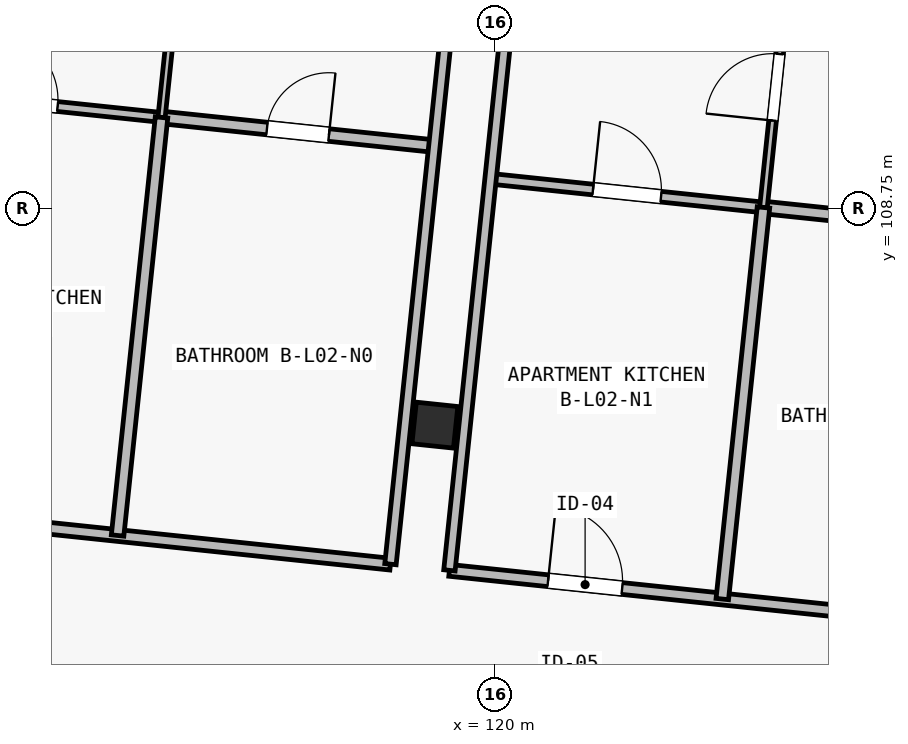
"""IFC4 building model, lengths in metres.
Left out: names, types, materials, properties, quantities, classifications, styles, units other than length and angle.
Written with IfcOpenShell. Run it as: python <this file> out.ifc"""

import sys

from ifc_helpers import new_model, si_unit, direction, frame, frame_2d, origin, origin_2d, place, context, subcontext, project, spatial, rectangle, extrude, element, fill, save


model = new_model("IFC4")
c1 = context("Model", 3, precision=1e-05, world=origin(), true_north=direction((0.0, 1.0)))
c2 = subcontext(c1, "Body", "Model", "MODEL_VIEW")
j1 = project(units=[si_unit("LENGTHUNIT", "METRE"), si_unit("PLANEANGLEUNIT", "RADIAN")], contexts=[c1])
p1 = place(None, origin())
s1 = spatial("IfcSite", under=j1, at=p1, CompositionType="ELEMENT")
p2 = place(p1, origin())
s2 = spatial("IfcBuilding", under=s1, at=p2, CompositionType="ELEMENT")
p3 = place(p2, frame((0.0, 0.0, 8.4)))
s3 = spatial("IfcBuildingStorey", under=s2, at=p3, CompositionType="ELEMENT", Elevation=8.4)
p4 = place(p3, frame((119.21, 105.898, 0.0), z_axis=(0.0, 0.0, 1.0), x_axis=(0.994521895368, -0.104528463268, 0.0)))
e1 = element("IfcColumn", 1, at=p4, inside=s3, PredefinedType="COLUMN", context=c2, shape_type="SweptSolid", body=[
    extrude(rectangle(XDim=0.55, YDim=0.55, at=origin_2d()), origin(), (0.0, 0.0, 1.0), 3.25),
])
p5 = place(p3, frame((110.446, 102.817, 0.0), z_axis=(0.0, 0.0, 1.0), x_axis=(0.994522594842, -0.104521808006, 0.0)))
e2 = element("IfcWall", 2, at=p5, inside=s3, PredefinedType="PARTITIONING", context=c2, shape_type="SweptSolid", body=[
    extrude(rectangle(XDim=8.11, YDim=0.155, at=frame_2d((4.055, 0.0))), origin(), (0.0, 0.0, 1.0), 2.97),
])
p6 = place(p5, frame((2.085, 0.0, 0.0)))
e3 = element("IfcOpeningElement", 3, at=p6, cuts=e2, PredefinedType="OPENING", context=c2, shape_type="SweptSolid", body=[
    extrude(rectangle(XDim=0.98, YDim=2.15, at=frame_2d((0.49, 1.075))), frame((0.0, 0.093, 0.0), z_axis=(0.0, -1.0, 0.0), x_axis=(1.0, 0.0, 0.0)), (0.0, 0.0, 1.0), 0.185),
])
p7 = place(p3, frame((111.446, 104.824, 0.0), z_axis=(0.0, 0.0, 1.0), x_axis=(0.994522671024, -0.104521083137, 0.0)))
e4 = element("IfcWall", 4, at=p7, inside=s3, PredefinedType="PARTITIONING", context=c2, shape_type="SweptSolid", body=[
    extrude(rectangle(XDim=7.22, YDim=0.155, at=frame_2d((3.61, 0.0))), origin(), (0.0, 0.0, 1.0), 2.97),
])
p8 = place(p7, frame((1.305, 0.0, 0.0)))
e5 = element("IfcOpeningElement", 5, at=p8, cuts=e4, PredefinedType="OPENING", context=c2, shape_type="SweptSolid", body=[
    extrude(rectangle(XDim=1.02, YDim=2.2, at=frame_2d((0.51, 1.1))), frame((0.0, 0.093, 0.0), z_axis=(0.0, -1.0, 0.0), x_axis=(1.0, 0.0, 0.0)), (0.0, 0.0, 1.0), 0.185),
])
p9 = place(p3, frame((112.024, 110.323, 0.0), z_axis=(0.0, 0.0, 1.0), x_axis=(0.994519525119, -0.104551012229, 0.0)))
e6 = element("IfcWall", 6, at=p9, inside=s3, PredefinedType="PARTITIONING", context=c2, shape_type="SweptSolid", body=[
    extrude(rectangle(XDim=3.61, YDim=0.13, at=frame_2d((1.805, 0.0))), origin(), (0.0, 0.0, 1.0), 2.97),
])
p10 = place(p9, frame((1.355, 0.0, 0.0)))
e7 = element("IfcOpeningElement", 7, at=p10, cuts=e6, PredefinedType="OPENING", context=c2, shape_type="SweptSolid", body=[
    extrude(rectangle(XDim=0.88, YDim=2.1, at=frame_2d((0.44, 1.05))), frame((0.0, 0.08, 0.0), z_axis=(0.0, -1.0, 0.0), x_axis=(1.0, 0.0, 0.0)), (0.0, 0.0, 1.0), 0.16),
])
p11 = place(p3, frame((115.614, 109.946, 0.0), z_axis=(0.0, 0.0, 1.0), x_axis=(0.994525816262, -0.104491151726, 0.0)))
e8 = element("IfcWall", 8, at=p11, inside=s3, PredefinedType="PLUMBINGWALL", context=c2, shape_type="SweptSolid", body=[
    extrude(rectangle(XDim=3.61, YDim=0.165, at=frame_2d((1.805, 0.0))), origin(), (0.0, 0.0, 1.0), 2.97),
])
p12 = place(p11, frame((1.395, 0.0, 0.0)))
e9 = element("IfcOpeningElement", 9, at=p12, cuts=e8, PredefinedType="OPENING", context=c2, shape_type="SweptSolid", body=[
    extrude(rectangle(XDim=0.82, YDim=2.08, at=frame_2d((0.41, 1.04))), frame((0.0, 0.097, 0.0), z_axis=(0.0, -1.0, 0.0), x_axis=(1.0, 0.0, 0.0)), (0.0, 0.0, 1.0), 0.195),
])
p13 = place(p3, frame((115.614, 109.946, 0.0), z_axis=(0.0, 0.0, 1.0), x_axis=(0.104514950243, 0.994523315552, 0.0)))
e10 = element("IfcWall", 10, at=p13, inside=s3, PredefinedType="PARTITIONING", context=c2, shape_type="SweptSolid", body=[
    extrude(rectangle(XDim=4.34, YDim=0.095, at=frame_2d((2.17, 0.0))), origin(), (0.0, 0.0, 1.0), 2.97),
])
p14 = place(p13, frame((1.15, 0.0, 0.0)))
e11 = element("IfcOpeningElement", 11, at=p14, cuts=e10, PredefinedType="OPENING", context=c2, shape_type="SweptSolid", body=[
    extrude(rectangle(XDim=0.9, YDim=2.1, at=frame_2d((0.45, 1.05))), frame((0.0, 0.062, 0.0), z_axis=(0.0, -1.0, 0.0), x_axis=(1.0, 0.0, 0.0)), (0.0, 0.0, 1.0), 0.125),
])
p15 = place(p3, frame((115.036, 104.447, 0.0), z_axis=(0.0, 0.0, 1.0), x_axis=(0.104546890769, 0.994519958387, 0.0)))
e12 = element("IfcWall", 12, at=p15, inside=s3, PredefinedType="PLUMBINGWALL", context=c2, shape_type="SweptSolid", body=[
    extrude(rectangle(XDim=5.53, YDim=0.165, at=frame_2d((2.765, 0.0))), origin(), (0.0, 0.0, 1.0), 2.97),
])
p16 = place(p3, frame((118.626, 104.069, 0.0), z_axis=(0.0, 0.0, 1.0), x_axis=(0.104508379977, 0.994524006002, 0.0)))
e13 = element("IfcWall", 13, at=p16, inside=s3, PredefinedType="PARTITIONING", context=c2, shape_type="SweptSolid", body=[
    extrude(rectangle(XDim=9.87, YDim=0.15, at=frame_2d((4.935, 0.0))), origin(), (0.0, 0.0, 1.0), 2.97),
])
p17 = place(p3, frame((119.402, 103.988, 0.0), z_axis=(0.0, 0.0, 1.0), x_axis=(0.994522671024, -0.104521083137, 0.0)))
e14 = element("IfcWall", 14, at=p17, inside=s3, PredefinedType="PARTITIONING", context=c2, shape_type="SweptSolid", body=[
    extrude(rectangle(XDim=7.22, YDim=0.155, at=frame_2d((3.61, 0.0))), origin(), (0.0, 0.0, 1.0), 2.97),
])
p18 = place(p17, frame((1.305, 0.0, 0.0)))
e15 = element("IfcOpeningElement", 15, at=p18, cuts=e14, PredefinedType="OPENING", context=c2, shape_type="SweptSolid", body=[
    extrude(rectangle(XDim=0.98, YDim=2.15, at=frame_2d((0.49, 1.075))), frame((0.0, 0.093, 0.0), z_axis=(0.0, -1.0, 0.0), x_axis=(1.0, 0.0, 0.0)), (0.0, 0.0, 1.0), 0.185),
])
p19 = place(p3, frame((119.943, 109.139, 0.0), z_axis=(0.0, 0.0, 1.0), x_axis=(0.994525816262, -0.104491151726, 0.0)))
e16 = element("IfcWall", 16, at=p19, inside=s3, PredefinedType="PARTITIONING", context=c2, shape_type="SweptSolid", body=[
    extrude(rectangle(XDim=3.61, YDim=0.14, at=frame_2d((1.805, 0.0))), origin(), (0.0, 0.0, 1.0), 2.97),
])
p20 = place(p19, frame((1.355, 0.0, 0.0)))
e17 = element("IfcOpeningElement", 17, at=p20, cuts=e16, PredefinedType="OPENING", context=c2, shape_type="SweptSolid", body=[
    extrude(rectangle(XDim=0.9, YDim=2.1, at=frame_2d((0.45, 1.05))), frame((0.0, 0.085, 0.0), z_axis=(0.0, -1.0, 0.0), x_axis=(1.0, 0.0, 0.0)), (0.0, 0.0, 1.0), 0.17),
])
p21 = place(p3, frame((123.533, 108.762, 0.0), z_axis=(0.0, 0.0, 1.0), x_axis=(0.994519525119, -0.104551012229, 0.0)))
e18 = element("IfcWall", 18, at=p21, inside=s3, PredefinedType="PLUMBINGWALL", context=c2, shape_type="SweptSolid", body=[
    extrude(rectangle(XDim=3.61, YDim=0.165, at=frame_2d((1.805, 0.0))), origin(), (0.0, 0.0, 1.0), 2.97),
])
p22 = place(p21, frame((1.395, 0.0, 0.0)))
e19 = element("IfcOpeningElement", 19, at=p22, cuts=e18, PredefinedType="OPENING", context=c2, shape_type="SweptSolid", body=[
    extrude(rectangle(XDim=0.82, YDim=2.08, at=frame_2d((0.41, 1.04))), frame((0.0, 0.097, 0.0), z_axis=(0.0, -1.0, 0.0), x_axis=(1.0, 0.0, 0.0)), (0.0, 0.0, 1.0), 0.195),
])
p23 = place(p3, frame((123.533, 108.762, 0.0), z_axis=(0.0, 0.0, 1.0), x_axis=(0.104527618124, 0.994521984196, 0.0)))
e20 = element("IfcWall", 20, at=p23, inside=s3, PredefinedType="PARTITIONING", context=c2, shape_type="SweptSolid", body=[
    extrude(rectangle(XDim=4.69, YDim=0.1, at=frame_2d((2.345, 0.0))), origin(), (0.0, 0.0, 1.0), 2.97),
])
p24 = place(p23, frame((1.15, 0.0, 0.0)))
e21 = element("IfcOpeningElement", 21, at=p24, cuts=e20, PredefinedType="OPENING", context=c2, shape_type="SweptSolid", body=[
    extrude(rectangle(XDim=0.88, YDim=2.1, at=frame_2d((0.44, 1.05))), frame((0.0, 0.065, 0.0), z_axis=(0.0, -1.0, 0.0), x_axis=(1.0, 0.0, 0.0)), (0.0, 0.0, 1.0), 0.13),
])
p25 = place(p3, frame((122.992, 103.61, 0.0), z_axis=(0.0, 0.0, 1.0), x_axis=(0.104486063868, 0.994526350811, 0.0)))
e22 = element("IfcWall", 22, at=p25, inside=s3, PredefinedType="PLUMBINGWALL", context=c2, shape_type="SweptSolid", body=[
    extrude(rectangle(XDim=5.18, YDim=0.165, at=frame_2d((2.59, 0.0))), origin(), (0.0, 0.0, 1.0), 2.97),
])
p26 = place(p3, frame((119.402, 103.988, 0.0), z_axis=(0.0, 0.0, 1.0), x_axis=(0.10453284543, 0.994521434775, 0.0)))
e23 = element("IfcWall", 23, at=p26, inside=s3, PredefinedType="PARTITIONING", context=c2, shape_type="SweptSolid", body=[
    extrude(rectangle(XDim=9.87, YDim=0.15, at=frame_2d((4.935, 0.0))), origin(), (0.0, 0.0, 1.0), 2.97),
])
p27 = place(p10, origin())
e24 = element("IfcDoor", 24, at=p27, inside=s3, OperationType="SINGLE_SWING_LEFT", PredefinedType="DOOR", context=c2, shape_type="SweptSolid", body=[
    extrude(rectangle(XDim=0.88, YDim=2.1, at=frame_2d((0.44, 1.05))), frame((0.0, 0.025, 0.0), z_axis=(0.0, -1.0, 0.0), x_axis=(1.0, 0.0, 0.0)), (0.0, 0.0, 1.0), 0.05),
])
fill(e7, e24)
p28 = place(p12, origin())
e25 = element("IfcDoor", 25, at=p28, inside=s3, OperationType="SINGLE_SWING_RIGHT", PredefinedType="DOOR", context=c2, shape_type="SweptSolid", body=[
    extrude(rectangle(XDim=0.82, YDim=2.08, at=frame_2d((0.41, 1.04))), frame((0.0, 0.025, 0.0), z_axis=(0.0, -1.0, 0.0), x_axis=(1.0, 0.0, 0.0)), (0.0, 0.0, 1.0), 0.05),
])
fill(e9, e25)
p29 = place(p18, origin())
e26 = element("IfcDoor", 26, at=p29, inside=s3, OperationType="SINGLE_SWING_LEFT", PredefinedType="DOOR", context=c2, shape_type="SweptSolid", body=[
    extrude(rectangle(XDim=0.98, YDim=2.15, at=frame_2d((0.49, 1.075))), frame((0.0, 0.025, 0.0), z_axis=(0.0, -1.0, 0.0), x_axis=(1.0, 0.0, 0.0)), (0.0, 0.0, 1.0), 0.05),
])
fill(e15, e26)
p30 = place(p20, origin())
e27 = element("IfcDoor", 27, at=p30, inside=s3, OperationType="SINGLE_SWING_LEFT", PredefinedType="DOOR", context=c2, shape_type="SweptSolid", body=[
    extrude(rectangle(XDim=0.9, YDim=2.1, at=frame_2d((0.45, 1.05))), frame((0.0, 0.025, 0.0), z_axis=(0.0, -1.0, 0.0), x_axis=(1.0, 0.0, 0.0)), (0.0, 0.0, 1.0), 0.05),
])
fill(e17, e27)
p31 = place(p24, origin())
e28 = element("IfcDoor", 28, at=p31, inside=s3, OperationType="SINGLE_SWING_LEFT", PredefinedType="DOOR", context=c2, shape_type="SweptSolid", body=[
    extrude(rectangle(XDim=0.88, YDim=2.1, at=frame_2d((0.44, 1.05))), frame((0.0, 0.025, 0.0), z_axis=(0.0, -1.0, 0.0), x_axis=(1.0, 0.0, 0.0)), (0.0, 0.0, 1.0), 0.05),
])
fill(e21, e28)
save(model, sys.argv[1])
